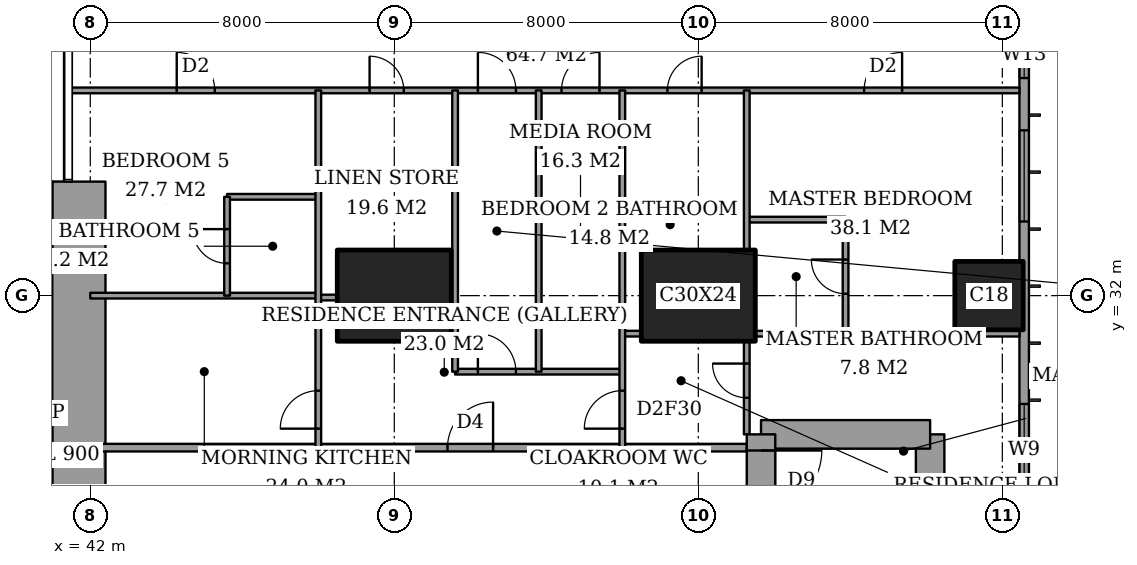
"""IFC4 building model, lengths in metres.
Left out: names, types, materials, properties, quantities, classifications, styles, units other than length and angle.
Written with IfcOpenShell. Run it as: python <this file> out.ifc"""

import sys

from ifc_helpers import new_model, si_unit, direction, frame, frame_2d, origin, origin_2d, place, context, subcontext, project, spatial, rectangle, extrude, element, fill, save


model = new_model("IFC4")
c1 = context("Model", 3, precision=1e-05, world=origin(), true_north=direction((0.0, 1.0)))
c2 = subcontext(c1, "Body", "Model", "MODEL_VIEW")
j1 = project(units=[si_unit("LENGTHUNIT", "METRE"), si_unit("PLANEANGLEUNIT", "RADIAN")], contexts=[c1])
p1 = place(None, origin())
s1 = spatial("IfcSite", under=j1, at=p1, CompositionType="ELEMENT")
p2 = place(p1, origin())
s2 = spatial("IfcBuilding", under=s1, at=p2, CompositionType="ELEMENT")
p3 = place(p2, frame((0.0, 0.0, 218.2)))
s3 = spatial("IfcBuildingStorey", under=s2, at=p3, CompositionType="ELEMENT", Elevation=218.2)
for number, where, z_axis, x_axis in (
    (1, (50.0, 32.0, 0.0), (0.0, 0.0, 1.0), (1.0, 0.0, 0.0)),
    (2, (58.0, 32.0, 0.0), (0.0, 0.0, 1.0), (1.0, 0.0, 0.0)),
):
    element("IfcColumn", number, at=place(p3, frame(where, z_axis=z_axis, x_axis=x_axis)), inside=s3, PredefinedType="COLUMN", context=c2, shape_type="SweptSolid", body=[
        extrude(rectangle(XDim=3.0, YDim=2.4, at=origin_2d()), origin(), (0.0, 0.0, 1.0), 3.6),
    ])
p4 = place(p3, frame((65.65, 32.0, 0.0), z_axis=(0.0, 0.0, 1.0), x_axis=(1.0, 0.0, 0.0)))
e3 = element("IfcColumn", 3, at=p4, inside=s3, PredefinedType="COLUMN", context=c2, shape_type="SweptSolid", body=[
    extrude(rectangle(XDim=1.8, YDim=1.8, at=origin_2d()), origin(), (0.0, 0.0, 1.0), 3.6),
])
p5 = place(p3, frame((41.7, 24.85, 0.0), z_axis=(0.0, 0.0, 1.0), x_axis=(0.0, 1.0, 0.0)))
e4 = element("IfcWall", 4, at=p5, inside=s3, PredefinedType="SHEAR", context=c2, shape_type="SweptSolid", body=[
    extrude(rectangle(XDim=10.15, YDim=1.4, at=frame_2d((5.075, 0.0))), origin(), (0.0, 0.0, 1.0), 3.6),
])
p6 = place(p3, frame((64.1, 19.65, 0.0), z_axis=(0.0, 0.0, 1.0), x_axis=(0.0, 1.0, 0.0)))
e5 = element("IfcWall", 5, at=p6, inside=s3, PredefinedType="SHEAR", context=c2, shape_type="SweptSolid", body=[
    extrude(rectangle(XDim=8.7, YDim=0.75, at=frame_2d((4.35, 0.0))), origin(), (0.0, 0.0, 1.0), 3.6),
])
p7 = place(p3, frame((64.1, 28.35, 0.0), z_axis=(0.0, 0.0, 1.0), x_axis=(-1.0, 0.0, 0.0)))
e6 = element("IfcWall", 6, at=p7, inside=s3, PredefinedType="SHEAR", context=c2, shape_type="SweptSolid", body=[
    extrude(rectangle(XDim=4.45, YDim=0.75, at=frame_2d((2.225, 0.0))), origin(), (0.0, 0.0, 1.0), 3.6),
])
p8 = place(p3, frame((59.65, 28.35, 0.0), z_axis=(0.0, 0.0, 1.0), x_axis=(0.0, -1.0, 0.0)))
e7 = element("IfcWall", 7, at=p8, inside=s3, PredefinedType="SHEAR", context=c2, shape_type="SweptSolid", body=[
    extrude(rectangle(XDim=8.7, YDim=0.75, at=frame_2d((4.35, 0.0))), origin(), (0.0, 0.0, 1.0), 3.6),
])
p9 = place(p8, frame((0.425, 0.0, 0.0)))
e8 = element("IfcOpeningElement", 8, at=p9, cuts=e7, PredefinedType="OPENING", context=c2, shape_type="SweptSolid", body=[
    extrude(rectangle(XDim=1.6, YDim=2.1, at=frame_2d((0.8, 1.05))), frame((0.0, 0.385, 0.0), z_axis=(0.0, -1.0, 0.0), x_axis=(1.0, 0.0, 0.0)), (0.0, 0.0, 1.0), 0.77),
])
p10 = place(p3, frame((66.575, 3.175, 0.0), z_axis=(0.0, 0.0, 1.0), x_axis=(0.0, 1.0, 0.0)))
e9 = element("IfcWall", 9, at=p10, inside=s3, PredefinedType="SOLIDWALL", context=c2, shape_type="SweptSolid", body=[
    extrude(rectangle(XDim=41.65, YDim=0.25, at=frame_2d((20.825, 0.0))), origin(), (0.0, 0.0, 1.0), 3.6),
])
p11 = place(p10, frame((0.825, 0.0, 0.2)))
e10 = element("IfcOpeningElement", 10, at=p11, cuts=e9, PredefinedType="OPENING", context=c2, shape_type="SweptSolid", body=[
    extrude(rectangle(XDim=2.4, YDim=2.4, at=frame_2d((1.2, 1.2))), frame((0.0, 0.135, 0.0), z_axis=(0.0, -1.0, 0.0), x_axis=(1.0, 0.0, 0.0)), (0.0, 0.0, 1.0), 0.27),
])
p12 = place(p10, frame((6.225, 0.0, 0.2)))
e11 = element("IfcOpeningElement", 11, at=p12, cuts=e9, PredefinedType="OPENING", context=c2, shape_type="SweptSolid", body=[
    extrude(rectangle(XDim=1.2, YDim=2.4, at=frame_2d((0.6, 1.2))), frame((0.0, 0.135, 0.0), z_axis=(0.0, -1.0, 0.0), x_axis=(1.0, 0.0, 0.0)), (0.0, 0.0, 1.0), 0.27),
])
p13 = place(p10, frame((8.675, 0.0, 0.2)))
e12 = element("IfcOpeningElement", 12, at=p13, cuts=e9, PredefinedType="OPENING", context=c2, shape_type="SweptSolid", body=[
    extrude(rectangle(XDim=2.4, YDim=2.4, at=frame_2d((1.2, 1.2))), frame((0.0, 0.135, 0.0), z_axis=(0.0, -1.0, 0.0), x_axis=(1.0, 0.0, 0.0)), (0.0, 0.0, 1.0), 0.27),
])
p14 = place(p10, frame((15.675, 0.0, 0.2)))
e13 = element("IfcOpeningElement", 13, at=p14, cuts=e9, PredefinedType="OPENING", context=c2, shape_type="SweptSolid", body=[
    extrude(rectangle(XDim=2.4, YDim=2.4, at=frame_2d((1.2, 1.2))), frame((0.0, 0.135, 0.0), z_axis=(0.0, -1.0, 0.0), x_axis=(1.0, 0.0, 0.0)), (0.0, 0.0, 1.0), 0.27),
])
p15 = place(p10, frame((23.575, 0.0, 0.2)))
e14 = element("IfcOpeningElement", 14, at=p15, cuts=e9, PredefinedType="OPENING", context=c2, shape_type="SweptSolid", body=[
    extrude(rectangle(XDim=2.4, YDim=2.4, at=frame_2d((1.2, 1.2))), frame((0.0, 0.135, 0.0), z_axis=(0.0, -1.0, 0.0), x_axis=(1.0, 0.0, 0.0)), (0.0, 0.0, 1.0), 0.27),
])
p16 = place(p10, frame((30.775, 0.0, 0.2)))
e15 = element("IfcOpeningElement", 15, at=p16, cuts=e9, PredefinedType="OPENING", context=c2, shape_type="SweptSolid", body=[
    extrude(rectangle(XDim=2.4, YDim=2.4, at=frame_2d((1.2, 1.2))), frame((0.0, 0.135, 0.0), z_axis=(0.0, -1.0, 0.0), x_axis=(1.0, 0.0, 0.0)), (0.0, 0.0, 1.0), 0.27),
])
p17 = place(p10, frame((34.55, 0.0, 0.2)))
e16 = element("IfcOpeningElement", 16, at=p17, cuts=e9, PredefinedType="OPENING", context=c2, shape_type="SweptSolid", body=[
    extrude(rectangle(XDim=1.2, YDim=2.4, at=frame_2d((0.6, 1.2))), frame((0.0, 0.135, 0.0), z_axis=(0.0, -1.0, 0.0), x_axis=(1.0, 0.0, 0.0)), (0.0, 0.0, 1.0), 0.27),
])
p18 = place(p10, frame((38.425, 0.0, 0.2)))
e17 = element("IfcOpeningElement", 17, at=p18, cuts=e9, PredefinedType="OPENING", context=c2, shape_type="SweptSolid", body=[
    extrude(rectangle(XDim=2.4, YDim=2.4, at=frame_2d((1.2, 1.2))), frame((0.0, 0.135, 0.0), z_axis=(0.0, -1.0, 0.0), x_axis=(1.0, 0.0, 0.0)), (0.0, 0.0, 1.0), 0.27),
])
p19 = place(p3, frame((42.0, 28.0, 0.0), z_axis=(0.0, 0.0, 1.0), x_axis=(1.0, 0.0, 0.0)))
e18 = element("IfcWall", 18, at=p19, inside=s3, PredefinedType="PARTITIONING", context=c2, shape_type="SweptSolid", body=[
    extrude(rectangle(XDim=17.275, YDim=0.2, at=frame_2d((8.637, 0.0))), origin(), (0.0, 0.0, 1.0), 3.35),
])
p20 = place(p19, frame((9.4, 0.0, 0.0)))
e19 = element("IfcOpeningElement", 19, at=p20, cuts=e18, PredefinedType="OPENING", context=c2, shape_type="SweptSolid", body=[
    extrude(rectangle(XDim=1.2, YDim=2.4, at=frame_2d((0.6, 1.2))), frame((0.0, 0.11, 0.0), z_axis=(0.0, -1.0, 0.0), x_axis=(1.0, 0.0, 0.0)), (0.0, 0.0, 1.0), 0.22),
])
p21 = place(p3, frame((51.6, 30.0, 0.0), z_axis=(0.0, 0.0, 1.0), x_axis=(1.0, 0.0, 0.0)))
e20 = element("IfcWall", 20, at=p21, inside=s3, PredefinedType="PARTITIONING", context=c2, shape_type="SweptSolid", body=[
    extrude(rectangle(XDim=4.4, YDim=0.15, at=frame_2d((2.2, 0.0))), origin(), (0.0, 0.0, 1.0), 3.35),
])
p22 = place(p21, frame((0.6, 0.0, 0.0)))
e21 = element("IfcOpeningElement", 21, at=p22, cuts=e20, PredefinedType="OPENING", context=c2, shape_type="SweptSolid", body=[
    extrude(rectangle(XDim=1.0, YDim=2.1, at=frame_2d((0.5, 1.05))), frame((0.0, 0.085, 0.0), z_axis=(0.0, -1.0, 0.0), x_axis=(1.0, 0.0, 0.0)), (0.0, 0.0, 1.0), 0.17),
])
p23 = place(p3, frame((56.0, 31.0, 0.0), z_axis=(0.0, 0.0, 1.0), x_axis=(1.0, 0.0, 0.0)))
e22 = element("IfcWall", 22, at=p23, inside=s3, PredefinedType="PARTITIONING", context=c2, shape_type="SweptSolid", body=[
    extrude(rectangle(XDim=0.5, YDim=0.15, at=frame_2d((0.25, 0.0))), origin(), (0.0, 0.0, 1.0), 3.35),
])
p24 = place(p3, frame((59.5, 31.0, 0.0), z_axis=(0.0, 0.0, 1.0), x_axis=(1.0, 0.0, 0.0)))
e23 = element("IfcWall", 23, at=p24, inside=s3, PredefinedType="PARTITIONING", context=c2, shape_type="SweptSolid", body=[
    extrude(rectangle(XDim=6.95, YDim=0.15, at=frame_2d((3.475, 0.0))), origin(), (0.0, 0.0, 1.0), 3.35),
])
p25 = place(p3, frame((48.0, 31.95, 0.0), z_axis=(0.0, 0.0, 1.0), x_axis=(1.0, 0.0, 0.0)))
e24 = element("IfcWall", 24, at=p25, inside=s3, PredefinedType="PARTITIONING", context=c2, shape_type="SweptSolid", body=[
    extrude(rectangle(XDim=0.5, YDim=0.15, at=frame_2d((0.25, 0.0))), origin(), (0.0, 0.0, 1.0), 2.634),
])
p26 = place(p3, frame((42.0, 32.0, 0.0), z_axis=(0.0, 0.0, 1.0), x_axis=(1.0, 0.0, 0.0)))
e25 = element("IfcWall", 25, at=p26, inside=s3, PredefinedType="PARTITIONING", context=c2, shape_type="SweptSolid", body=[
    extrude(rectangle(XDim=6.0, YDim=0.15, at=frame_2d((3.0, 0.0))), origin(), (0.0, 0.0, 1.0), 2.634),
])
p27 = place(p3, frame((59.275, 34.0, 0.0), z_axis=(0.0, 0.0, 1.0), x_axis=(1.0, 0.0, 0.0)))
e26 = element("IfcWall", 26, at=p27, inside=s3, PredefinedType="PARTITIONING", context=c2, shape_type="SweptSolid", body=[
    extrude(rectangle(XDim=2.6, YDim=0.15, at=frame_2d((1.3, 0.0))), origin(), (0.0, 0.0, 1.0), 3.35),
])
p28 = place(p3, frame((45.6, 34.6, 0.0), z_axis=(0.0, 0.0, 1.0), x_axis=(1.0, 0.0, 0.0)))
e27 = element("IfcWall", 27, at=p28, inside=s3, PredefinedType="PARTITIONING", context=c2, shape_type="SweptSolid", body=[
    extrude(rectangle(XDim=2.4, YDim=0.15, at=frame_2d((1.2, 0.0))), origin(), (0.0, 0.0, 1.0), 3.35),
])
p29 = place(p3, frame((41.439, 37.4, 0.0), z_axis=(0.0, 0.0, 1.0), x_axis=(1.0, 0.0, 0.0)))
e28 = element("IfcWall", 28, at=p29, inside=s3, PredefinedType="PARTITIONING", context=c2, shape_type="SweptSolid", body=[
    extrude(rectangle(XDim=25.011, YDim=0.15, at=frame_2d((12.505, 0.0))), origin(), (0.0, 0.0, 1.0), 3.35),
])
p30 = place(p29, frame((10.761, 0.0, 0.0)))
e29 = element("IfcOpeningElement", 29, at=p30, cuts=e28, PredefinedType="OPENING", context=c2, shape_type="SweptSolid", body=[
    extrude(rectangle(XDim=1.0, YDim=2.1, at=frame_2d((0.5, 1.05))), frame((0.0, 0.085, 0.0), z_axis=(0.0, -1.0, 0.0), x_axis=(1.0, 0.0, 0.0)), (0.0, 0.0, 1.0), 0.17),
])
p31 = place(p29, frame((20.924, 0.0, 0.0)))
e30 = element("IfcOpeningElement", 30, at=p31, cuts=e28, PredefinedType="OPENING", context=c2, shape_type="SweptSolid", body=[
    extrude(rectangle(XDim=1.0, YDim=2.1, at=frame_2d((0.5, 1.05))), frame((0.0, 0.085, 0.0), z_axis=(0.0, -1.0, 0.0), x_axis=(1.0, 0.0, 0.0)), (0.0, 0.0, 1.0), 0.17),
])
p32 = place(p29, frame((15.749, 0.0, 0.0)))
e31 = element("IfcOpeningElement", 31, at=p32, cuts=e28, PredefinedType="OPENING", context=c2, shape_type="SweptSolid", body=[
    extrude(rectangle(XDim=0.9, YDim=2.1, at=frame_2d((0.45, 1.05))), frame((0.0, 0.085, 0.0), z_axis=(0.0, -1.0, 0.0), x_axis=(1.0, 0.0, 0.0)), (0.0, 0.0, 1.0), 0.17),
])
p33 = place(p29, frame((12.961, 0.0, 0.0)))
e32 = element("IfcOpeningElement", 32, at=p33, cuts=e28, PredefinedType="OPENING", context=c2, shape_type="SweptSolid", body=[
    extrude(rectangle(XDim=1.0, YDim=2.1, at=frame_2d((0.5, 1.05))), frame((0.0, 0.085, 0.0), z_axis=(0.0, -1.0, 0.0), x_axis=(1.0, 0.0, 0.0)), (0.0, 0.0, 1.0), 0.17),
])
p34 = place(p29, frame((7.911, 0.0, 0.0)))
e33 = element("IfcOpeningElement", 33, at=p34, cuts=e28, PredefinedType="OPENING", context=c2, shape_type="SweptSolid", body=[
    extrude(rectangle(XDim=0.9, YDim=2.1, at=frame_2d((0.45, 1.05))), frame((0.0, 0.085, 0.0), z_axis=(0.0, -1.0, 0.0), x_axis=(1.0, 0.0, 0.0)), (0.0, 0.0, 1.0), 0.17),
])
p35 = place(p29, frame((2.836, 0.0, 0.0)))
e34 = element("IfcOpeningElement", 34, at=p35, cuts=e28, PredefinedType="OPENING", context=c2, shape_type="SweptSolid", body=[
    extrude(rectangle(XDim=1.0, YDim=2.1, at=frame_2d((0.5, 1.05))), frame((0.0, 0.085, 0.0), z_axis=(0.0, -1.0, 0.0), x_axis=(1.0, 0.0, 0.0)), (0.0, 0.0, 1.0), 0.17),
])
p36 = place(p3, frame((45.6, 32.0, 0.0), z_axis=(0.0, 0.0, 1.0), x_axis=(0.0, 1.0, 0.0)))
e35 = element("IfcWall", 35, at=p36, inside=s3, PredefinedType="PARTITIONING", context=c2, shape_type="SweptSolid", body=[
    extrude(rectangle(XDim=2.6, YDim=0.15, at=frame_2d((1.3, 0.0))), origin(), (0.0, 0.0, 1.0), 3.35),
])
p37 = place(p36, frame((0.85, 0.0, 0.0)))
e36 = element("IfcOpeningElement", 36, at=p37, cuts=e35, PredefinedType="OPENING", context=c2, shape_type="SweptSolid", body=[
    extrude(rectangle(XDim=0.9, YDim=2.1, at=frame_2d((0.45, 1.05))), frame((0.0, 0.085, 0.0), z_axis=(0.0, -1.0, 0.0), x_axis=(1.0, 0.0, 0.0)), (0.0, 0.0, 1.0), 0.17),
])
p38 = place(p3, frame((48.0, 28.0, 0.0), z_axis=(0.0, 0.0, 1.0), x_axis=(0.0, 1.0, 0.0)))
e37 = element("IfcWall", 37, at=p38, inside=s3, PredefinedType="PARTITIONING", context=c2, shape_type="SweptSolid", body=[
    extrude(rectangle(XDim=9.4, YDim=0.15, at=frame_2d((4.7, 0.0))), origin(), (0.0, 0.0, 1.0), 3.35),
])
p39 = place(p38, frame((0.5, 0.0, 0.0)))
e38 = element("IfcOpeningElement", 38, at=p39, cuts=e37, PredefinedType="OPENING", context=c2, shape_type="SweptSolid", body=[
    extrude(rectangle(XDim=1.0, YDim=2.1, at=frame_2d((0.5, 1.05))), frame((0.0, 0.085, 0.0), z_axis=(0.0, -1.0, 0.0), x_axis=(1.0, 0.0, 0.0)), (0.0, 0.0, 1.0), 0.17),
])
for number, where, z_axis, x_axis in (
    (39, (51.6, 30.0, 0.0), (0.0, 0.0, 1.0), (0.0, 1.0, 0.0)),
    (40, (53.8, 30.0, 0.0), (0.0, 0.0, 1.0), (0.0, 1.0, 0.0)),
):
    element("IfcWall", number, at=place(p3, frame(where, z_axis=z_axis, x_axis=x_axis)), inside=s3, PredefinedType="PARTITIONING", context=c2, shape_type="SweptSolid", body=[
        extrude(rectangle(XDim=7.4, YDim=0.15, at=frame_2d((3.7, 0.0))), origin(), (0.0, 0.0, 1.0), 3.35),
    ])
p40 = place(p3, frame((56.0, 28.0, 0.0), z_axis=(0.0, 0.0, 1.0), x_axis=(0.0, 1.0, 0.0)))
e41 = element("IfcWall", 41, at=p40, inside=s3, PredefinedType="PARTITIONING", context=c2, shape_type="SweptSolid", body=[
    extrude(rectangle(XDim=9.4, YDim=0.15, at=frame_2d((4.7, 0.0))), origin(), (0.0, 0.0, 1.0), 3.35),
])
p41 = place(p40, frame((0.5, 0.0, 0.0)))
e42 = element("IfcOpeningElement", 42, at=p41, cuts=e41, PredefinedType="OPENING", context=c2, shape_type="SweptSolid", body=[
    extrude(rectangle(XDim=1.0, YDim=2.1, at=frame_2d((0.5, 1.05))), frame((0.0, 0.085, 0.0), z_axis=(0.0, -1.0, 0.0), x_axis=(1.0, 0.0, 0.0)), (0.0, 0.0, 1.0), 0.17),
])
p42 = place(p3, frame((59.275, 28.35, 0.0), z_axis=(0.0, 0.0, 1.0), x_axis=(0.0, 1.0, 0.0)))
e43 = element("IfcWall", 43, at=p42, inside=s3, PredefinedType="PARTITIONING", context=c2, shape_type="SweptSolid", body=[
    extrude(rectangle(XDim=2.45, YDim=0.15, at=frame_2d((1.225, 0.0))), origin(), (0.0, 0.0, 1.0), 3.35),
])
p43 = place(p42, frame((0.962, 0.0, 0.0)))
e44 = element("IfcOpeningElement", 44, at=p43, cuts=e43, PredefinedType="OPENING", context=c2, shape_type="SweptSolid", body=[
    extrude(rectangle(XDim=0.9, YDim=2.1, at=frame_2d((0.45, 1.05))), frame((0.0, 0.085, 0.0), z_axis=(0.0, -1.0, 0.0), x_axis=(1.0, 0.0, 0.0)), (0.0, 0.0, 1.0), 0.17),
])
p44 = place(p3, frame((59.275, 33.2, 0.0), z_axis=(0.0, 0.0, 1.0), x_axis=(0.0, 1.0, 0.0)))
e45 = element("IfcWall", 45, at=p44, inside=s3, PredefinedType="PARTITIONING", context=c2, shape_type="SweptSolid", body=[
    extrude(rectangle(XDim=4.2, YDim=0.15, at=frame_2d((2.1, 0.0))), origin(), (0.0, 0.0, 1.0), 3.35),
])
p45 = place(p3, frame((61.875, 31.0, 0.0), z_axis=(0.0, 0.0, 1.0), x_axis=(0.0, 1.0, 0.0)))
e46 = element("IfcWall", 46, at=p45, inside=s3, PredefinedType="PARTITIONING", context=c2, shape_type="SweptSolid", body=[
    extrude(rectangle(XDim=3.0, YDim=0.15, at=frame_2d((1.5, 0.0))), origin(), (0.0, 0.0, 1.0), 3.35),
])
p46 = place(p45, frame((1.05, 0.0, 0.0)))
e47 = element("IfcOpeningElement", 47, at=p46, cuts=e46, PredefinedType="OPENING", context=c2, shape_type="SweptSolid", body=[
    extrude(rectangle(XDim=0.9, YDim=2.1, at=frame_2d((0.45, 1.05))), frame((0.0, 0.085, 0.0), z_axis=(0.0, -1.0, 0.0), x_axis=(1.0, 0.0, 0.0)), (0.0, 0.0, 1.0), 0.17),
])
p47 = place(p15, origin())
e48 = element("IfcWindow", 48, at=p47, inside=s3, PartitioningType="SINGLE_PANEL", PredefinedType="WINDOW", context=c2, shape_type="SweptSolid", body=[
    extrude(rectangle(XDim=2.4, YDim=2.4, at=frame_2d((1.2, 1.2))), frame((0.0, 0.03, 0.0), z_axis=(0.0, -1.0, 0.0), x_axis=(1.0, 0.0, 0.0)), (0.0, 0.0, 1.0), 0.06),
])
fill(e14, e48)
p48 = place(p16, origin())
e49 = element("IfcWindow", 49, at=p48, inside=s3, PartitioningType="SINGLE_PANEL", PredefinedType="WINDOW", context=c2, shape_type="SweptSolid", body=[
    extrude(rectangle(XDim=2.4, YDim=2.4, at=frame_2d((1.2, 1.2))), frame((0.0, 0.03, 0.0), z_axis=(0.0, -1.0, 0.0), x_axis=(1.0, 0.0, 0.0)), (0.0, 0.0, 1.0), 0.06),
])
fill(e15, e49)
p49 = place(p17, origin())
e50 = element("IfcWindow", 50, at=p49, inside=s3, PartitioningType="SINGLE_PANEL", PredefinedType="WINDOW", context=c2, shape_type="SweptSolid", body=[
    extrude(rectangle(XDim=1.2, YDim=2.4, at=frame_2d((0.6, 1.2))), frame((0.0, 0.03, 0.0), z_axis=(0.0, -1.0, 0.0), x_axis=(1.0, 0.0, 0.0)), (0.0, 0.0, 1.0), 0.06),
])
fill(e16, e50)
p50 = place(p30, origin())
e51 = element("IfcDoor", 51, at=p50, inside=s3, OperationType="SINGLE_SWING_RIGHT", PredefinedType="DOOR", context=c2, shape_type="SweptSolid", body=[
    extrude(rectangle(XDim=1.0, YDim=2.1, at=frame_2d((0.5, 1.05))), frame((0.0, 0.025, 0.0), z_axis=(0.0, -1.0, 0.0), x_axis=(1.0, 0.0, 0.0)), (0.0, 0.0, 1.0), 0.05),
])
fill(e29, e51)
p51 = place(p46, origin())
e52 = element("IfcDoor", 52, at=p51, inside=s3, OperationType="SINGLE_SWING_LEFT", PredefinedType="DOOR", context=c2, shape_type="SweptSolid", body=[
    extrude(rectangle(XDim=0.9, YDim=2.1, at=frame_2d((0.45, 1.05))), frame((0.0, 0.025, 0.0), z_axis=(0.0, -1.0, 0.0), x_axis=(1.0, 0.0, 0.0)), (0.0, 0.0, 1.0), 0.05),
])
fill(e47, e52)
p52 = place(p31, origin())
e53 = element("IfcDoor", 53, at=p52, inside=s3, OperationType="SINGLE_SWING_LEFT", PredefinedType="DOOR", context=c2, shape_type="SweptSolid", body=[
    extrude(rectangle(XDim=1.0, YDim=2.1, at=frame_2d((0.5, 1.05))), frame((0.0, 0.025, 0.0), z_axis=(0.0, -1.0, 0.0), x_axis=(1.0, 0.0, 0.0)), (0.0, 0.0, 1.0), 0.05),
])
fill(e30, e53)
p53 = place(p43, origin())
e54 = element("IfcDoor", 54, at=p53, inside=s3, OperationType="SINGLE_SWING_LEFT", PredefinedType="DOOR", context=c2, shape_type="SweptSolid", body=[
    extrude(rectangle(XDim=0.9, YDim=2.1, at=frame_2d((0.45, 1.05))), frame((0.0, 0.025, 0.0), z_axis=(0.0, -1.0, 0.0), x_axis=(1.0, 0.0, 0.0)), (0.0, 0.0, 1.0), 0.05),
])
fill(e44, e54)
p54 = place(p32, origin())
e55 = element("IfcDoor", 55, at=p54, inside=s3, OperationType="SINGLE_SWING_LEFT", PredefinedType="DOOR", context=c2, shape_type="SweptSolid", body=[
    extrude(rectangle(XDim=0.9, YDim=2.1, at=frame_2d((0.45, 1.05))), frame((0.0, 0.025, 0.0), z_axis=(0.0, -1.0, 0.0), x_axis=(1.0, 0.0, 0.0)), (0.0, 0.0, 1.0), 0.05),
])
fill(e31, e55)
p55 = place(p41, origin())
e56 = element("IfcDoor", 56, at=p55, inside=s3, OperationType="SINGLE_SWING_RIGHT", PredefinedType="DOOR", context=c2, shape_type="SweptSolid", body=[
    extrude(rectangle(XDim=1.0, YDim=2.1, at=frame_2d((0.5, 1.05))), frame((0.0, 0.025, 0.0), z_axis=(0.0, -1.0, 0.0), x_axis=(1.0, 0.0, 0.0)), (0.0, 0.0, 1.0), 0.05),
])
fill(e42, e56)
p56 = place(p20, origin())
e57 = element("IfcDoor", 57, at=p56, inside=s3, OperationType="SINGLE_SWING_LEFT", PredefinedType="DOOR", context=c2, shape_type="SweptSolid", body=[
    extrude(rectangle(XDim=1.2, YDim=2.4, at=frame_2d((0.6, 1.2))), frame((0.0, 0.025, 0.0), z_axis=(0.0, -1.0, 0.0), x_axis=(1.0, 0.0, 0.0)), (0.0, 0.0, 1.0), 0.05),
])
fill(e19, e57)
p57 = place(p33, origin())
e58 = element("IfcDoor", 58, at=p57, inside=s3, OperationType="SINGLE_SWING_LEFT", PredefinedType="DOOR", context=c2, shape_type="SweptSolid", body=[
    extrude(rectangle(XDim=1.0, YDim=2.1, at=frame_2d((0.5, 1.05))), frame((0.0, 0.025, 0.0), z_axis=(0.0, -1.0, 0.0), x_axis=(1.0, 0.0, 0.0)), (0.0, 0.0, 1.0), 0.05),
])
fill(e32, e58)
p58 = place(p22, origin())
e59 = element("IfcDoor", 59, at=p58, inside=s3, OperationType="SINGLE_SWING_RIGHT", PredefinedType="DOOR", context=c2, shape_type="SweptSolid", body=[
    extrude(rectangle(XDim=1.0, YDim=2.1, at=frame_2d((0.5, 1.05))), frame((0.0, 0.025, 0.0), z_axis=(0.0, -1.0, 0.0), x_axis=(1.0, 0.0, 0.0)), (0.0, 0.0, 1.0), 0.05),
])
fill(e21, e59)
p59 = place(p34, origin())
e60 = element("IfcDoor", 60, at=p59, inside=s3, OperationType="SINGLE_SWING_RIGHT", PredefinedType="DOOR", context=c2, shape_type="SweptSolid", body=[
    extrude(rectangle(XDim=0.9, YDim=2.1, at=frame_2d((0.45, 1.05))), frame((0.0, 0.025, 0.0), z_axis=(0.0, -1.0, 0.0), x_axis=(1.0, 0.0, 0.0)), (0.0, 0.0, 1.0), 0.05),
])
fill(e33, e60)
p60 = place(p37, origin())
e61 = element("IfcDoor", 61, at=p60, inside=s3, OperationType="SINGLE_SWING_LEFT", PredefinedType="DOOR", context=c2, shape_type="SweptSolid", body=[
    extrude(rectangle(XDim=0.9, YDim=2.1, at=frame_2d((0.45, 1.05))), frame((0.0, 0.025, 0.0), z_axis=(0.0, -1.0, 0.0), x_axis=(1.0, 0.0, 0.0)), (0.0, 0.0, 1.0), 0.05),
])
fill(e36, e61)
p61 = place(p35, origin())
e62 = element("IfcDoor", 62, at=p61, inside=s3, OperationType="SINGLE_SWING_RIGHT", PredefinedType="DOOR", context=c2, shape_type="SweptSolid", body=[
    extrude(rectangle(XDim=1.0, YDim=2.1, at=frame_2d((0.5, 1.05))), frame((0.0, 0.025, 0.0), z_axis=(0.0, -1.0, 0.0), x_axis=(1.0, 0.0, 0.0)), (0.0, 0.0, 1.0), 0.05),
])
fill(e34, e62)
p62 = place(p39, origin())
e63 = element("IfcDoor", 63, at=p62, inside=s3, OperationType="SINGLE_SWING_RIGHT", PredefinedType="DOOR", context=c2, shape_type="SweptSolid", body=[
    extrude(rectangle(XDim=1.0, YDim=2.1, at=frame_2d((0.5, 1.05))), frame((0.0, 0.025, 0.0), z_axis=(0.0, -1.0, 0.0), x_axis=(1.0, 0.0, 0.0)), (0.0, 0.0, 1.0), 0.05),
])
fill(e38, e63)
p63 = place(p9, origin())
e64 = element("IfcDoor", 64, at=p63, inside=s3, OperationType="DOUBLE_DOOR_SINGLE_SWING", PredefinedType="DOOR", context=c2, shape_type="SweptSolid", body=[
    extrude(rectangle(XDim=1.6, YDim=2.1, at=frame_2d((0.8, 1.05))), frame((0.0, 0.025, 0.0), z_axis=(0.0, -1.0, 0.0), x_axis=(1.0, 0.0, 0.0)), (0.0, 0.0, 1.0), 0.05),
])
fill(e8, e64)
save(model, sys.argv[1])
